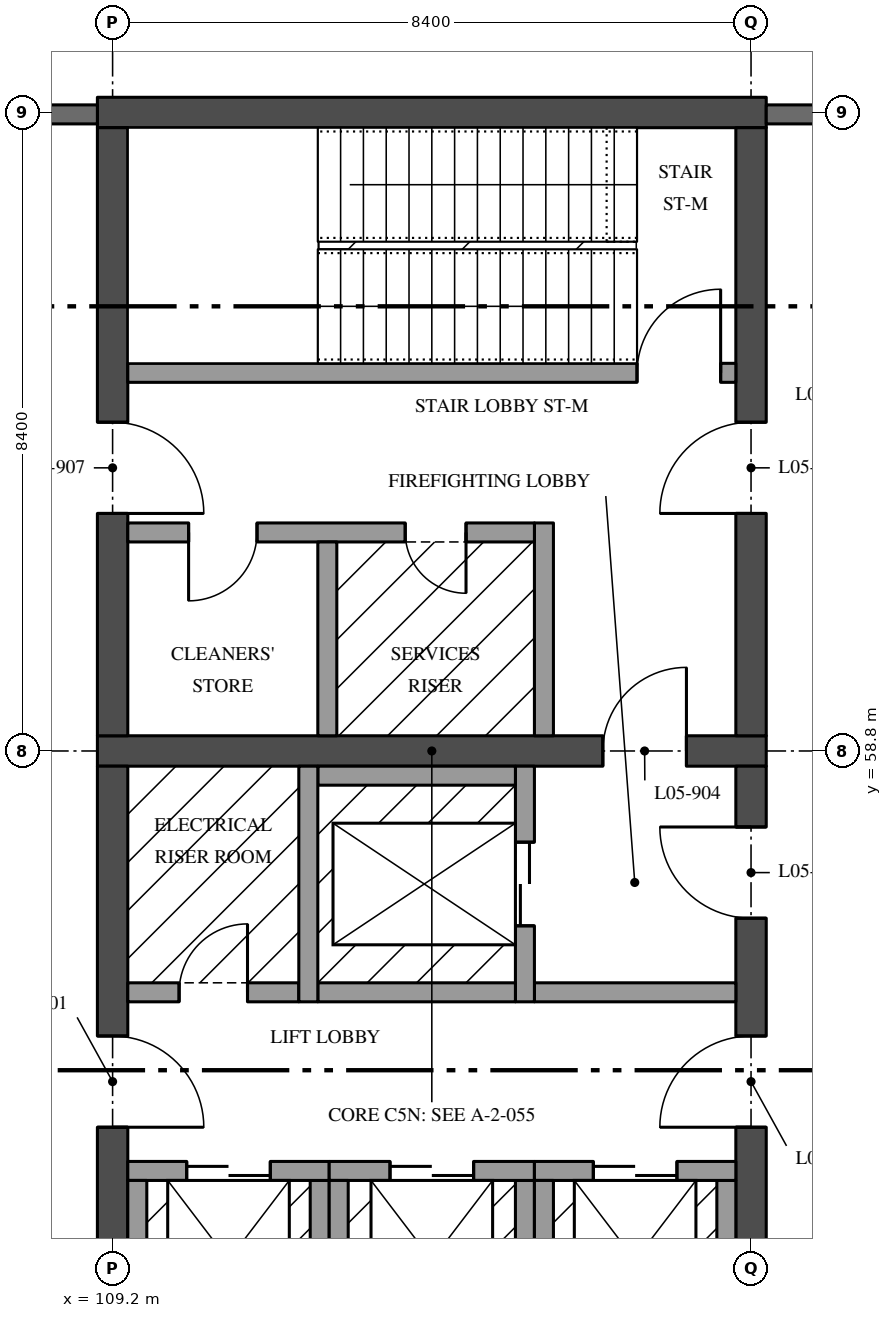
"""IFC4 building model, lengths in metres.
Left out: names, types, materials, properties, quantities, classifications, styles, units other than length and angle.
Written with IfcOpenShell. Run it as: python <this file> out.ifc"""

import sys

from ifc_helpers import new_model, si_unit, direction, frame, frame_2d, origin, place, context, subcontext, project, spatial, rectangle, extrude, element, fill, save


model = new_model("IFC4")
c1 = context("Model", 3, precision=1e-05, world=origin(), true_north=direction((0.0, 1.0)))
c2 = subcontext(c1, "Body", "Model", "MODEL_VIEW")
j1 = project(units=[si_unit("LENGTHUNIT", "METRE"), si_unit("PLANEANGLEUNIT", "RADIAN")], contexts=[c1])
p1 = place(None, origin())
s1 = spatial("IfcSite", under=j1, at=p1, CompositionType="ELEMENT")
p2 = place(p1, origin())
s2 = spatial("IfcBuilding", under=s1, at=p2, CompositionType="ELEMENT")
p3 = place(p2, frame((0.0, 0.0, 23.4)))
s3 = spatial("IfcBuildingStorey", under=s2, at=p3, CompositionType="ELEMENT", Elevation=23.4)
p4 = place(p3, frame((109.0, 58.8, 0.0), z_axis=(0.0, 0.0, 1.0), x_axis=(1.0, 0.0, 0.0)))
e1 = element("IfcWall", 1, at=p4, inside=s3, PredefinedType="SHEAR", context=c2, shape_type="SweptSolid", body=[
    extrude(rectangle(XDim=8.8, YDim=0.4, at=frame_2d((4.4, 0.0))), origin(), (0.0, 0.0, 1.0), 4.37),
])
p5 = place(p4, frame((6.65, 0.0, 0.0)))
e2 = element("IfcOpeningElement", 2, at=p5, cuts=e1, PredefinedType="OPENING", context=c2, shape_type="SweptSolid", body=[
    extrude(rectangle(XDim=1.1, YDim=2.1, at=frame_2d((0.55, 1.05))), frame((0.0, 0.21, 0.0), z_axis=(0.0, -1.0, 0.0), x_axis=(1.0, 0.0, 0.0)), (0.0, 0.0, 1.0), 0.42),
])
p6 = place(p3, frame((109.2, 50.6, 0.0), z_axis=(0.0, 0.0, 1.0), x_axis=(0.0, 1.0, 0.0)))
e3 = element("IfcWall", 3, at=p6, inside=s3, PredefinedType="SHEAR", context=c2, shape_type="SweptSolid", body=[
    extrude(rectangle(XDim=8.0, YDim=0.4, at=frame_2d((4.0, 0.0))), origin(), (0.0, 0.0, 1.0), 4.37),
])
p7 = place(p6, frame((3.25, 0.0, 0.0)))
e4 = element("IfcOpeningElement", 4, at=p7, cuts=e3, PredefinedType="OPENING", context=c2, shape_type="SweptSolid", body=[
    extrude(rectangle(XDim=1.2, YDim=2.1, at=frame_2d((0.6, 1.05))), frame((0.0, 0.21, 0.0), z_axis=(0.0, -1.0, 0.0), x_axis=(1.0, 0.0, 0.0)), (0.0, 0.0, 1.0), 0.42),
])
p8 = place(p3, frame((117.6, 50.6, 0.0), z_axis=(0.0, 0.0, 1.0), x_axis=(0.0, 1.0, 0.0)))
e5 = element("IfcWall", 5, at=p8, inside=s3, PredefinedType="SHEAR", context=c2, shape_type="SweptSolid", body=[
    extrude(rectangle(XDim=8.0, YDim=0.4, at=frame_2d((4.0, 0.0))), origin(), (0.0, 0.0, 1.0), 4.37),
])
p9 = place(p8, frame((3.25, 0.0, 0.0)))
e6 = element("IfcOpeningElement", 6, at=p9, cuts=e5, PredefinedType="OPENING", context=c2, shape_type="SweptSolid", body=[
    extrude(rectangle(XDim=1.2, YDim=2.1, at=frame_2d((0.6, 1.05))), frame((0.0, 0.21, 0.0), z_axis=(0.0, -1.0, 0.0), x_axis=(1.0, 0.0, 0.0)), (0.0, 0.0, 1.0), 0.42),
])
p10 = place(p8, frame((6.0, 0.0, 0.0)))
e7 = element("IfcOpeningElement", 7, at=p10, cuts=e5, PredefinedType="OPENING", context=c2, shape_type="SweptSolid", body=[
    extrude(rectangle(XDim=1.2, YDim=2.1, at=frame_2d((0.6, 1.05))), frame((0.0, 0.21, 0.0), z_axis=(0.0, -1.0, 0.0), x_axis=(1.0, 0.0, 0.0)), (0.0, 0.0, 1.0), 0.42),
])
p11 = place(p3, frame((109.4, 55.625, 0.0), z_axis=(0.0, 0.0, 1.0), x_axis=(1.0, 0.0, 0.0)))
e8 = element("IfcWall", 8, at=p11, inside=s3, PredefinedType="SOLIDWALL", context=c2, shape_type="SweptSolid", body=[
    extrude(rectangle(XDim=2.25, YDim=0.25, at=frame_2d((1.125, 0.0))), origin(), (0.0, 0.0, 1.0), 4.37),
])
p12 = place(p11, frame((0.675, 0.0, 0.0)))
e9 = element("IfcOpeningElement", 9, at=p12, cuts=e8, PredefinedType="OPENING", context=c2, shape_type="SweptSolid", body=[
    extrude(rectangle(XDim=0.9, YDim=2.1, at=frame_2d((0.45, 1.05))), frame((0.0, 0.135, 0.0), z_axis=(0.0, -1.0, 0.0), x_axis=(1.0, 0.0, 0.0)), (0.0, 0.0, 1.0), 0.27),
])
p13 = place(p3, frame((114.75, 55.625, 0.0), z_axis=(0.0, 0.0, 1.0), x_axis=(1.0, 0.0, 0.0)))
e10 = element("IfcWall", 10, at=p13, inside=s3, PredefinedType="SOLIDWALL", context=c2, shape_type="SweptSolid", body=[
    extrude(rectangle(XDim=2.65, YDim=0.25, at=frame_2d((1.325, 0.0))), origin(), (0.0, 0.0, 1.0), 4.37),
])
p14 = place(p3, frame((109.0, 67.2, 0.0), z_axis=(0.0, 0.0, 1.0), x_axis=(1.0, 0.0, 0.0)))
e11 = element("IfcWall", 11, at=p14, inside=s3, PredefinedType="SHEAR", context=c2, shape_type="SweptSolid", body=[
    extrude(rectangle(XDim=8.8, YDim=0.4, at=frame_2d((4.4, 0.0))), origin(), (0.0, 0.0, 1.0), 4.37),
])
p15 = place(p3, frame((109.2, 59.0, 0.0), z_axis=(0.0, 0.0, 1.0), x_axis=(0.0, 1.0, 0.0)))
e12 = element("IfcWall", 12, at=p15, inside=s3, PredefinedType="SHEAR", context=c2, shape_type="SweptSolid", body=[
    extrude(rectangle(XDim=8.0, YDim=0.4, at=frame_2d((4.0, 0.0))), origin(), (0.0, 0.0, 1.0), 4.37),
])
p16 = place(p15, frame((2.925, 0.0, 0.0)))
e13 = element("IfcOpeningElement", 13, at=p16, cuts=e12, PredefinedType="OPENING", context=c2, shape_type="SweptSolid", body=[
    extrude(rectangle(XDim=1.2, YDim=2.1, at=frame_2d((0.6, 1.05))), frame((0.0, 0.21, 0.0), z_axis=(0.0, -1.0, 0.0), x_axis=(1.0, 0.0, 0.0)), (0.0, 0.0, 1.0), 0.42),
])
p17 = place(p3, frame((117.6, 59.0, 0.0), z_axis=(0.0, 0.0, 1.0), x_axis=(0.0, 1.0, 0.0)))
e14 = element("IfcWall", 14, at=p17, inside=s3, PredefinedType="SHEAR", context=c2, shape_type="SweptSolid", body=[
    extrude(rectangle(XDim=8.0, YDim=0.4, at=frame_2d((4.0, 0.0))), origin(), (0.0, 0.0, 1.0), 4.37),
])
p18 = place(p17, frame((2.925, 0.0, 0.0)))
e15 = element("IfcOpeningElement", 15, at=p18, cuts=e14, PredefinedType="OPENING", context=c2, shape_type="SweptSolid", body=[
    extrude(rectangle(XDim=1.2, YDim=2.1, at=frame_2d((0.6, 1.05))), frame((0.0, 0.21, 0.0), z_axis=(0.0, -1.0, 0.0), x_axis=(1.0, 0.0, 0.0)), (0.0, 0.0, 1.0), 0.42),
])
p19 = place(p3, frame((117.4, 63.775, 0.0), z_axis=(0.0, 0.0, 1.0), x_axis=(-1.0, 0.0, 0.0)))
e16 = element("IfcWall", 16, at=p19, inside=s3, PredefinedType="SOLIDWALL", context=c2, shape_type="SweptSolid", body=[
    extrude(rectangle(XDim=8.0, YDim=0.25, at=frame_2d((4.0, 0.0))), origin(), (0.0, 0.0, 1.0), 4.37),
])
p20 = place(p19, frame((0.2, 0.0, 0.0)))
e17 = element("IfcOpeningElement", 17, at=p20, cuts=e16, PredefinedType="OPENING", context=c2, shape_type="SweptSolid", body=[
    extrude(rectangle(XDim=1.1, YDim=2.1, at=frame_2d((0.55, 1.05))), frame((0.0, 0.135, 0.0), z_axis=(0.0, -1.0, 0.0), x_axis=(1.0, 0.0, 0.0)), (0.0, 0.0, 1.0), 0.27),
])
p21 = place(p3, frame((114.875, 61.8, 0.0), z_axis=(0.0, 0.0, 1.0), x_axis=(0.0, -1.0, 0.0)))
e18 = element("IfcWall", 18, at=p21, inside=s3, PredefinedType="SOLIDWALL", context=c2, shape_type="SweptSolid", body=[
    extrude(rectangle(XDim=2.8, YDim=0.25, at=frame_2d((1.4, 0.0))), origin(), (0.0, 0.0, 1.0), 4.37),
])
p22 = place(p3, frame((114.75, 61.675, 0.0), z_axis=(0.0, 0.0, 1.0), x_axis=(-1.0, 0.0, 0.0)))
e19 = element("IfcWall", 19, at=p22, inside=s3, PredefinedType="SOLIDWALL", context=c2, shape_type="SweptSolid", body=[
    extrude(rectangle(XDim=5.35, YDim=0.25, at=frame_2d((2.675, 0.0))), origin(), (0.0, 0.0, 1.0), 4.37),
])
p23 = place(p22, frame((3.65, 0.0, 0.0)))
e20 = element("IfcOpeningElement", 20, at=p23, cuts=e19, PredefinedType="OPENING", context=c2, shape_type="SweptSolid", body=[
    extrude(rectangle(XDim=0.9, YDim=2.1, at=frame_2d((0.45, 1.05))), frame((0.0, 0.135, 0.0), z_axis=(0.0, -1.0, 0.0), x_axis=(1.0, 0.0, 0.0)), (0.0, 0.0, 1.0), 0.27),
])
p24 = place(p22, frame((0.9, 0.0, 0.0)))
e21 = element("IfcOpeningElement", 21, at=p24, cuts=e19, PredefinedType="OPENING", context=c2, shape_type="SweptSolid", body=[
    extrude(rectangle(XDim=0.8, YDim=2.1, at=frame_2d((0.4, 1.05))), frame((0.0, 0.135, 0.0), z_axis=(0.0, -1.0, 0.0), x_axis=(1.0, 0.0, 0.0)), (0.0, 0.0, 1.0), 0.27),
])
p25 = place(p3, frame((112.025, 61.55, 0.0), z_axis=(0.0, 0.0, 1.0), x_axis=(0.0, -1.0, 0.0)))
e22 = element("IfcWall", 22, at=p25, inside=s3, PredefinedType="SOLIDWALL", context=c2, shape_type="SweptSolid", body=[
    extrude(rectangle(XDim=2.55, YDim=0.25, at=frame_2d((1.275, 0.0))), origin(), (0.0, 0.0, 1.0), 4.37),
])
p26 = place(p3, frame((114.625, 55.5, 0.0), z_axis=(0.0, 0.0, 1.0), x_axis=(0.0, 1.0, 0.0)))
e23 = element("IfcWall", 23, at=p26, inside=s3, PredefinedType="SOLIDWALL", context=c2, shape_type="SweptSolid", body=[
    extrude(rectangle(XDim=3.1, YDim=0.25, at=frame_2d((1.55, 0.0))), origin(), (0.0, 0.0, 1.0), 4.37),
])
p27 = place(p26, frame((1.0, 0.0, 0.0)))
e24 = element("IfcOpeningElement", 24, at=p27, cuts=e23, PredefinedType="OPENING", context=c2, shape_type="SweptSolid", body=[
    extrude(rectangle(XDim=1.1, YDim=2.1, at=frame_2d((0.55, 1.05))), frame((0.0, 0.135, 0.0), z_axis=(0.0, -1.0, 0.0), x_axis=(1.0, 0.0, 0.0)), (0.0, 0.0, 1.0), 0.27),
])
for number, where, z_axis, x_axis in (
    (25, (111.9, 58.475, 0.0), (0.0, 0.0, 1.0), (1.0, 0.0, 0.0)),
    (26, (111.9, 55.625, 0.0), (0.0, 0.0, 1.0), (1.0, 0.0, 0.0)),
):
    element("IfcWall", number, at=place(p3, frame(where, z_axis=z_axis, x_axis=x_axis)), inside=s3, PredefinedType="SOLIDWALL", context=c2, shape_type="SweptSolid", body=[
        extrude(rectangle(XDim=2.6, YDim=0.25, at=frame_2d((1.3, 0.0))), origin(), (0.0, 0.0, 1.0), 4.37),
    ])
p28 = place(p3, frame((111.775, 55.5, 0.0), z_axis=(0.0, 0.0, 1.0), x_axis=(0.0, 1.0, 0.0)))
e27 = element("IfcWall", 27, at=p28, inside=s3, PredefinedType="SOLIDWALL", context=c2, shape_type="SweptSolid", body=[
    extrude(rectangle(XDim=3.1, YDim=0.25, at=frame_2d((1.55, 0.0))), origin(), (0.0, 0.0, 1.0), 4.37),
])
p29 = place(p3, frame((111.925, 50.85, 0.0), z_axis=(0.0, 0.0, 1.0), x_axis=(0.0, 1.0, 0.0)))
e28 = element("IfcWall", 28, at=p29, inside=s3, PredefinedType="SOLIDWALL", context=c2, shape_type="SweptSolid", body=[
    extrude(rectangle(XDim=2.3, YDim=0.25, at=frame_2d((1.15, 0.0))), origin(), (0.0, 0.0, 1.0), 4.37),
])
p30 = place(p3, frame((109.4, 53.275, 0.0), z_axis=(0.0, 0.0, 1.0), x_axis=(1.0, 0.0, 0.0)))
e29 = element("IfcWall", 29, at=p30, inside=s3, PredefinedType="SOLIDWALL", context=c2, shape_type="SweptSolid", body=[
    extrude(rectangle(XDim=2.65, YDim=0.25, at=frame_2d((1.325, 0.0))), origin(), (0.0, 0.0, 1.0), 4.37),
])
p31 = place(p30, frame((0.775, 0.0, 0.0)))
e30 = element("IfcOpeningElement", 30, at=p31, cuts=e29, PredefinedType="OPENING", context=c2, shape_type="SweptSolid", body=[
    extrude(rectangle(XDim=1.1, YDim=2.1, at=frame_2d((0.55, 1.05))), frame((0.0, 0.135, 0.0), z_axis=(0.0, -1.0, 0.0), x_axis=(1.0, 0.0, 0.0)), (0.0, 0.0, 1.0), 0.27),
])
for number, where, z_axis, x_axis in (
    (31, (109.525, 50.85, 0.0), (0.0, 0.0, 1.0), (0.0, 1.0, 0.0)),
    (32, (114.625, 50.85, 0.0), (0.0, 0.0, 1.0), (0.0, 1.0, 0.0)),
):
    element("IfcWall", number, at=place(p3, frame(where, z_axis=z_axis, x_axis=x_axis)), inside=s3, PredefinedType="SOLIDWALL", context=c2, shape_type="SweptSolid", body=[
        extrude(rectangle(XDim=2.3, YDim=0.25, at=frame_2d((1.15, 0.0))), origin(), (0.0, 0.0, 1.0), 4.37),
    ])
p32 = place(p3, frame((112.05, 53.275, 0.0), z_axis=(0.0, 0.0, 1.0), x_axis=(1.0, 0.0, 0.0)))
e33 = element("IfcWall", 33, at=p32, inside=s3, PredefinedType="SOLIDWALL", context=c2, shape_type="SweptSolid", body=[
    extrude(rectangle(XDim=2.7, YDim=0.25, at=frame_2d((1.35, 0.0))), origin(), (0.0, 0.0, 1.0), 4.37),
])
p33 = place(p32, frame((0.8, 0.0, 0.0)))
e34 = element("IfcOpeningElement", 34, at=p33, cuts=e33, PredefinedType="OPENING", context=c2, shape_type="SweptSolid", body=[
    extrude(rectangle(XDim=1.1, YDim=2.1, at=frame_2d((0.55, 1.05))), frame((0.0, 0.135, 0.0), z_axis=(0.0, -1.0, 0.0), x_axis=(1.0, 0.0, 0.0)), (0.0, 0.0, 1.0), 0.27),
])
for number, where, z_axis, x_axis in (
    (35, (112.175, 50.85, 0.0), (0.0, 0.0, 1.0), (0.0, 1.0, 0.0)),
    (36, (117.275, 50.85, 0.0), (0.0, 0.0, 1.0), (0.0, 1.0, 0.0)),
):
    element("IfcWall", number, at=place(p3, frame(where, z_axis=z_axis, x_axis=x_axis)), inside=s3, PredefinedType="SOLIDWALL", context=c2, shape_type="SweptSolid", body=[
        extrude(rectangle(XDim=2.3, YDim=0.25, at=frame_2d((1.15, 0.0))), origin(), (0.0, 0.0, 1.0), 4.37),
    ])
p34 = place(p3, frame((114.75, 53.275, 0.0), z_axis=(0.0, 0.0, 1.0), x_axis=(1.0, 0.0, 0.0)))
e37 = element("IfcWall", 37, at=p34, inside=s3, PredefinedType="SOLIDWALL", context=c2, shape_type="SweptSolid", body=[
    extrude(rectangle(XDim=2.65, YDim=0.25, at=frame_2d((1.325, 0.0))), origin(), (0.0, 0.0, 1.0), 4.37),
])
p35 = place(p34, frame((0.775, 0.0, 0.0)))
e38 = element("IfcOpeningElement", 38, at=p35, cuts=e37, PredefinedType="OPENING", context=c2, shape_type="SweptSolid", body=[
    extrude(rectangle(XDim=1.1, YDim=2.1, at=frame_2d((0.55, 1.05))), frame((0.0, 0.135, 0.0), z_axis=(0.0, -1.0, 0.0), x_axis=(1.0, 0.0, 0.0)), (0.0, 0.0, 1.0), 0.27),
])
p36 = place(p3, frame((114.875, 50.85, 0.0), z_axis=(0.0, 0.0, 1.0), x_axis=(0.0, 1.0, 0.0)))
e39 = element("IfcWall", 39, at=p36, inside=s3, PredefinedType="SOLIDWALL", context=c2, shape_type="SweptSolid", body=[
    extrude(rectangle(XDim=2.3, YDim=0.25, at=frame_2d((1.15, 0.0))), origin(), (0.0, 0.0, 1.0), 4.37),
])
p37 = place(p3, frame((125.997, 67.175, 0.0), z_axis=(0.0, 0.0, 1.0), x_axis=(-1.0, 0.0, 0.0)))
e40 = element("IfcWall", 40, at=p37, inside=s3, PredefinedType="SOLIDWALL", context=c2, shape_type="SweptSolid", body=[
    extrude(rectangle(XDim=8.197, YDim=0.25, at=frame_2d((4.098, 0.0))), origin(), (0.0, 0.0, 1.0), 3.746),
])
p38 = place(p37, frame((1.597, 0.0, 0.0)))
e41 = element("IfcOpeningElement", 41, at=p38, cuts=e40, PredefinedType="OPENING", context=c2, shape_type="SweptSolid", body=[
    extrude(rectangle(XDim=1.0, YDim=2.4, at=frame_2d((0.5, 1.2))), frame((0.0, 0.135, 0.0), z_axis=(0.0, -1.0, 0.0), x_axis=(1.0, 0.0, 0.0)), (0.0, 0.0, 1.0), 0.27),
])
p39 = place(p3, frame((109.0, 67.175, 0.0), z_axis=(0.0, 0.0, 1.0), x_axis=(-1.0, 0.0, 0.0)))
e42 = element("IfcWall", 42, at=p39, inside=s3, PredefinedType="SOLIDWALL", context=c2, shape_type="SweptSolid", body=[
    extrude(rectangle(XDim=8.197, YDim=0.25, at=frame_2d((4.098, 0.0))), origin(), (0.0, 0.0, 1.0), 3.746),
])
p40 = place(p39, frame((4.9, 0.0, 0.9)))
e43 = element("IfcOpeningElement", 43, at=p40, cuts=e42, PredefinedType="OPENING", context=c2, shape_type="SweptSolid", body=[
    extrude(rectangle(XDim=2.4, YDim=2.25, at=frame_2d((1.2, 1.125))), frame((0.0, 0.135, 0.0), z_axis=(0.0, -1.0, 0.0), x_axis=(1.0, 0.0, 0.0)), (0.0, 0.0, 1.0), 0.27),
])
p41 = place(p7, frame((1.2, 0.0, 0.0), z_axis=(0.0, 0.0, 1.0), x_axis=(-1.0, 0.0, 0.0)))
e44 = element("IfcDoor", 44, at=p41, inside=s3, OperationType="SINGLE_SWING_LEFT", PredefinedType="DOOR", context=c2, shape_type="SweptSolid", body=[
    extrude(rectangle(XDim=1.2, YDim=2.1, at=frame_2d((0.6, 1.05))), frame((0.0, 0.035, 0.0), z_axis=(0.0, -1.0, 0.0), x_axis=(1.0, 0.0, 0.0)), (0.0, 0.0, 1.0), 0.07),
])
fill(e4, e44)
p42 = place(p9, origin())
e45 = element("IfcDoor", 45, at=p42, inside=s3, OperationType="SINGLE_SWING_RIGHT", PredefinedType="DOOR", context=c2, shape_type="SweptSolid", body=[
    extrude(rectangle(XDim=1.2, YDim=2.1, at=frame_2d((0.6, 1.05))), frame((0.0, 0.035, 0.0), z_axis=(0.0, -1.0, 0.0), x_axis=(1.0, 0.0, 0.0)), (0.0, 0.0, 1.0), 0.07),
])
fill(e6, e45)
p43 = place(p10, origin())
e46 = element("IfcDoor", 46, at=p43, inside=s3, OperationType="SINGLE_SWING_LEFT", PredefinedType="DOOR", context=c2, shape_type="SweptSolid", body=[
    extrude(rectangle(XDim=1.2, YDim=2.1, at=frame_2d((0.6, 1.05))), frame((0.0, 0.035, 0.0), z_axis=(0.0, -1.0, 0.0), x_axis=(1.0, 0.0, 0.0)), (0.0, 0.0, 1.0), 0.07),
])
fill(e7, e46)
p44 = place(p5, origin())
e47 = element("IfcDoor", 47, at=p44, inside=s3, OperationType="SINGLE_SWING_LEFT", PredefinedType="DOOR", context=c2, shape_type="SweptSolid", body=[
    extrude(rectangle(XDim=1.1, YDim=2.1, at=frame_2d((0.55, 1.05))), frame((0.0, 0.035, 0.0), z_axis=(0.0, -1.0, 0.0), x_axis=(1.0, 0.0, 0.0)), (0.0, 0.0, 1.0), 0.07),
])
fill(e2, e47)
p45 = place(p12, origin())
e48 = element("IfcDoor", 48, at=p45, inside=s3, OperationType="SINGLE_SWING_LEFT", PredefinedType="DOOR", context=c2, shape_type="SweptSolid", body=[
    extrude(rectangle(XDim=0.9, YDim=2.1, at=frame_2d((0.45, 1.05))), frame((0.0, 0.05, 0.0), z_axis=(0.0, -1.0, 0.0), x_axis=(1.0, 0.0, 0.0)), (0.0, 0.0, 1.0), 0.1),
])
fill(e9, e48)
p46 = place(p23, origin())
e49 = element("IfcDoor", 49, at=p46, inside=s3, OperationType="SINGLE_SWING_LEFT", PredefinedType="DOOR", context=c2, shape_type="SweptSolid", body=[
    extrude(rectangle(XDim=0.9, YDim=2.1, at=frame_2d((0.45, 1.05))), frame((0.0, 0.035, 0.0), z_axis=(0.0, -1.0, 0.0), x_axis=(1.0, 0.0, 0.0)), (0.0, 0.0, 1.0), 0.07),
])
fill(e20, e49)
p47 = place(p16, frame((1.2, 0.0, 0.0), z_axis=(0.0, 0.0, 1.0), x_axis=(-1.0, 0.0, 0.0)))
e50 = element("IfcDoor", 50, at=p47, inside=s3, OperationType="SINGLE_SWING_LEFT", PredefinedType="DOOR", context=c2, shape_type="SweptSolid", body=[
    extrude(rectangle(XDim=1.2, YDim=2.1, at=frame_2d((0.6, 1.05))), frame((0.0, 0.035, 0.0), z_axis=(0.0, -1.0, 0.0), x_axis=(1.0, 0.0, 0.0)), (0.0, 0.0, 1.0), 0.07),
])
fill(e13, e50)
p48 = place(p18, origin())
e51 = element("IfcDoor", 51, at=p48, inside=s3, OperationType="SINGLE_SWING_RIGHT", PredefinedType="DOOR", context=c2, shape_type="SweptSolid", body=[
    extrude(rectangle(XDim=1.2, YDim=2.1, at=frame_2d((0.6, 1.05))), frame((0.0, 0.035, 0.0), z_axis=(0.0, -1.0, 0.0), x_axis=(1.0, 0.0, 0.0)), (0.0, 0.0, 1.0), 0.07),
])
fill(e15, e51)
p49 = place(p24, origin())
e52 = element("IfcDoor", 52, at=p49, inside=s3, OperationType="SINGLE_SWING_RIGHT", PredefinedType="DOOR", context=c2, shape_type="SweptSolid", body=[
    extrude(rectangle(XDim=0.8, YDim=2.1, at=frame_2d((0.4, 1.05))), frame((0.0, 0.035, 0.0), z_axis=(0.0, -1.0, 0.0), x_axis=(1.0, 0.0, 0.0)), (0.0, 0.0, 1.0), 0.07),
])
fill(e21, e52)
p50 = place(p20, frame((1.1, 0.0, 0.0), z_axis=(0.0, 0.0, 1.0), x_axis=(-1.0, 0.0, 0.0)))
e53 = element("IfcDoor", 53, at=p50, inside=s3, OperationType="SINGLE_SWING_LEFT", PredefinedType="DOOR", context=c2, shape_type="SweptSolid", body=[
    extrude(rectangle(XDim=1.1, YDim=2.1, at=frame_2d((0.55, 1.05))), frame((0.0, 0.035, 0.0), z_axis=(0.0, -1.0, 0.0), x_axis=(1.0, 0.0, 0.0)), (0.0, 0.0, 1.0), 0.07),
])
fill(e17, e53)
p51 = place(p27, origin())
e54 = element("IfcDoor", 54, at=p51, inside=s3, OperationType="DOUBLE_DOOR_SLIDING", PredefinedType="DOOR", context=c2, shape_type="SweptSolid", body=[
    extrude(rectangle(XDim=1.1, YDim=2.1, at=frame_2d((0.55, 1.05))), frame((0.0, 0.04, 0.0), z_axis=(0.0, -1.0, 0.0), x_axis=(1.0, 0.0, 0.0)), (0.0, 0.0, 1.0), 0.08),
])
fill(e24, e54)
p52 = place(p31, origin())
e55 = element("IfcDoor", 55, at=p52, inside=s3, OperationType="DOUBLE_DOOR_SLIDING", PredefinedType="DOOR", context=c2, shape_type="SweptSolid", body=[
    extrude(rectangle(XDim=1.1, YDim=2.1, at=frame_2d((0.55, 1.05))), frame((0.0, 0.04, 0.0), z_axis=(0.0, -1.0, 0.0), x_axis=(1.0, 0.0, 0.0)), (0.0, 0.0, 1.0), 0.08),
])
fill(e30, e55)
p53 = place(p33, origin())
e56 = element("IfcDoor", 56, at=p53, inside=s3, OperationType="DOUBLE_DOOR_SLIDING", PredefinedType="DOOR", context=c2, shape_type="SweptSolid", body=[
    extrude(rectangle(XDim=1.1, YDim=2.1, at=frame_2d((0.55, 1.05))), frame((0.0, 0.04, 0.0), z_axis=(0.0, -1.0, 0.0), x_axis=(1.0, 0.0, 0.0)), (0.0, 0.0, 1.0), 0.08),
])
fill(e34, e56)
p54 = place(p35, origin())
e57 = element("IfcDoor", 57, at=p54, inside=s3, OperationType="DOUBLE_DOOR_SLIDING", PredefinedType="DOOR", context=c2, shape_type="SweptSolid", body=[
    extrude(rectangle(XDim=1.1, YDim=2.1, at=frame_2d((0.55, 1.05))), frame((0.0, 0.04, 0.0), z_axis=(0.0, -1.0, 0.0), x_axis=(1.0, 0.0, 0.0)), (0.0, 0.0, 1.0), 0.08),
])
fill(e38, e57)
save(model, sys.argv[1])
